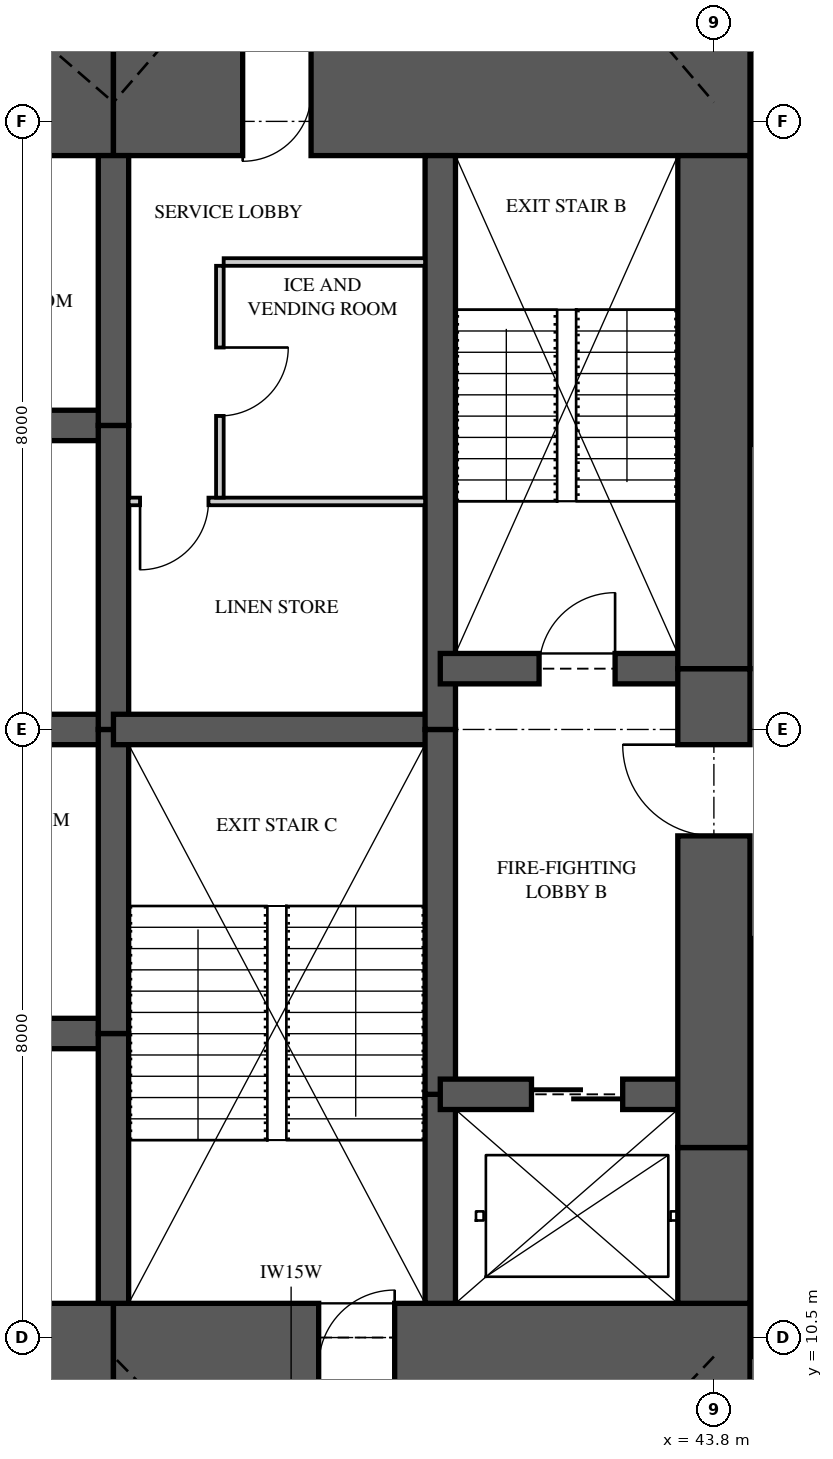
"""IFC4 building model, lengths in metres.
Left out: names, types, materials, properties, quantities, classifications, styles, units other than length and angle.
Written with IfcOpenShell. Run it as: python <this file> out.ifc"""

import sys

from ifc_helpers import new_model, si_unit, direction, frame, frame_2d, origin, place, context, subcontext, project, spatial, rectangle, extrude, element, fill, save


model = new_model("IFC4")
c1 = context("Model", 3, precision=1e-05, world=origin(), true_north=direction((0.0, 1.0)))
c2 = subcontext(c1, "Body", "Model", "MODEL_VIEW")
j1 = project(units=[si_unit("LENGTHUNIT", "METRE"), si_unit("PLANEANGLEUNIT", "RADIAN")], contexts=[c1])
p1 = place(None, origin())
s1 = spatial("IfcSite", under=j1, at=p1, CompositionType="ELEMENT")
p2 = place(p1, origin())
s2 = spatial("IfcBuilding", under=s1, at=p2, CompositionType="ELEMENT")
p3 = place(p2, frame((0.0, 0.0, 71.25)))
s3 = spatial("IfcBuildingStorey", under=s2, at=p3, CompositionType="ELEMENT", Elevation=71.25)
p4 = place(p3, frame((31.6, 10.125, 0.0), z_axis=(0.0, 0.0, 1.0), x_axis=(1.0, 0.0, 0.0)))
e1 = element("IfcWall", 1, at=p4, inside=s3, PredefinedType="SHEAR", context=c2, shape_type="SweptSolid", body=[
    extrude(rectangle(XDim=4.3, YDim=1.65, at=frame_2d((2.15, 0.0))), origin(), (0.0, 0.0, 1.0), 3.5),
])
p5 = place(p3, frame((35.9, 10.125, 0.0), z_axis=(0.0, 0.0, 1.0), x_axis=(1.0, 0.0, 0.0)))
e2 = element("IfcWall", 2, at=p5, inside=s3, PredefinedType="SHEAR", context=c2, shape_type="SweptSolid", body=[
    extrude(rectangle(XDim=8.375, YDim=1.65, at=frame_2d((4.188, 0.0))), origin(), (0.0, 0.0, 1.0), 3.5),
])
p6 = place(p5, frame((2.7, 0.0, 0.0)))
e3 = element("IfcOpeningElement", 3, at=p6, cuts=e2, PredefinedType="OPENING", context=c2, shape_type="SweptSolid", body=[
    extrude(rectangle(XDim=1.0, YDim=2.1, at=frame_2d((0.5, 1.05))), frame((0.0, 0.835, 0.0), z_axis=(0.0, -1.0, 0.0), x_axis=(1.0, 0.0, 0.0)), (0.0, 0.0, 1.0), 1.67),
])
p7 = place(p3, frame((44.275, 26.875, 0.0), z_axis=(0.0, 0.0, 1.0), x_axis=(-1.0, 0.0, 0.0)))
e4 = element("IfcWall", 4, at=p7, inside=s3, PredefinedType="SHEAR", context=c2, shape_type="SweptSolid", body=[
    extrude(rectangle(XDim=8.375, YDim=1.65, at=frame_2d((4.188, 0.0))), origin(), (0.0, 0.0, 1.0), 3.5),
])
p8 = place(p7, frame((5.775, 0.0, 0.0)))
e5 = element("IfcOpeningElement", 5, at=p8, cuts=e4, PredefinedType="OPENING", context=c2, shape_type="SweptSolid", body=[
    extrude(rectangle(XDim=0.9, YDim=2.1, at=frame_2d((0.45, 1.05))), frame((0.0, 0.835, 0.0), z_axis=(0.0, -1.0, 0.0), x_axis=(1.0, 0.0, 0.0)), (0.0, 0.0, 1.0), 1.67),
])
p9 = place(p3, frame((35.9, 26.875, 0.0), z_axis=(0.0, 0.0, 1.0), x_axis=(-1.0, 0.0, 0.0)))
e6 = element("IfcWall", 6, at=p9, inside=s3, PredefinedType="SHEAR", context=c2, shape_type="SweptSolid", body=[
    extrude(rectangle(XDim=4.3, YDim=1.65, at=frame_2d((2.15, 0.0))), origin(), (0.0, 0.0, 1.0), 3.5),
])
p10 = place(p3, frame((43.8, 10.95, 0.0), z_axis=(0.0, 0.0, 1.0), x_axis=(0.0, 1.0, 0.0)))
e7 = element("IfcWall", 7, at=p10, inside=s3, PredefinedType="SHEAR", context=c2, shape_type="SweptSolid", body=[
    extrude(rectangle(XDim=2.05, YDim=0.95, at=frame_2d((1.025, 0.0))), origin(), (0.0, 0.0, 1.0), 3.5),
])
p11 = place(p3, frame((43.8, 13.0, 0.0), z_axis=(0.0, 0.0, 1.0), x_axis=(0.0, 1.0, 0.0)))
e8 = element("IfcWall", 8, at=p11, inside=s3, PredefinedType="SHEAR", context=c2, shape_type="SweptSolid", body=[
    extrude(rectangle(XDim=6.3, YDim=0.95, at=frame_2d((3.15, 0.0))), origin(), (0.0, 0.0, 1.0), 3.5),
])
p12 = place(p11, frame((4.1, 0.0, 0.0)))
e9 = element("IfcOpeningElement", 9, at=p12, cuts=e8, PredefinedType="OPENING", context=c2, shape_type="SweptSolid", body=[
    extrude(rectangle(XDim=1.2, YDim=2.2, at=frame_2d((0.6, 1.1))), frame((0.0, 0.485, 0.0), z_axis=(0.0, -1.0, 0.0), x_axis=(1.0, 0.0, 0.0)), (0.0, 0.0, 1.0), 0.97),
])
p13 = place(p3, frame((43.8, 19.3, 0.0), z_axis=(0.0, 0.0, 1.0), x_axis=(0.0, 1.0, 0.0)))
e10 = element("IfcWall", 10, at=p13, inside=s3, PredefinedType="SHEAR", context=c2, shape_type="SweptSolid", body=[
    extrude(rectangle(XDim=6.75, YDim=0.95, at=frame_2d((3.375, 0.0))), origin(), (0.0, 0.0, 1.0), 3.5),
])
p14 = place(p3, frame((35.9, 10.95, 0.0), z_axis=(0.0, 0.0, 1.0), x_axis=(0.0, 1.0, 0.0)))
e11 = element("IfcWall", 11, at=p14, inside=s3, PredefinedType="SHEAR", context=c2, shape_type="SweptSolid", body=[
    extrude(rectangle(XDim=3.55, YDim=0.4, at=frame_2d((1.775, 0.0))), origin(), (0.0, 0.0, 1.0), 3.5),
])
for number, where, z_axis, x_axis in (
    (12, (35.9, 14.5, 0.0), (0.0, 0.0, 1.0), (0.0, 1.0, 0.0)),
    (13, (35.9, 18.5, 0.0), (0.0, 0.0, 1.0), (0.0, 1.0, 0.0)),
):
    element("IfcWall", number, at=place(p3, frame(where, z_axis=z_axis, x_axis=x_axis)), inside=s3, PredefinedType="SHEAR", context=c2, shape_type="SweptSolid", body=[
        extrude(rectangle(XDim=4.0, YDim=0.4, at=frame_2d((2.0, 0.0))), origin(), (0.0, 0.0, 1.0), 3.5),
    ])
p15 = place(p3, frame((35.9, 22.5, 0.0), z_axis=(0.0, 0.0, 1.0), x_axis=(0.0, 1.0, 0.0)))
e14 = element("IfcWall", 14, at=p15, inside=s3, PredefinedType="SHEAR", context=c2, shape_type="SweptSolid", body=[
    extrude(rectangle(XDim=3.55, YDim=0.4, at=frame_2d((1.775, 0.0))), origin(), (0.0, 0.0, 1.0), 3.5),
])
p16 = place(p3, frame((40.2, 10.95, 0.0), z_axis=(0.0, 0.0, 1.0), x_axis=(0.0, 1.0, 0.0)))
e15 = element("IfcWall", 15, at=p16, inside=s3, PredefinedType="SHEAR", context=c2, shape_type="SweptSolid", body=[
    extrude(rectangle(XDim=2.75, YDim=0.4, at=frame_2d((1.375, 0.0))), origin(), (0.0, 0.0, 1.0), 3.5),
])
p17 = place(p3, frame((40.2, 13.7, 0.0), z_axis=(0.0, 0.0, 1.0), x_axis=(0.0, 1.0, 0.0)))
e16 = element("IfcWall", 16, at=p17, inside=s3, PredefinedType="SHEAR", context=c2, shape_type="SweptSolid", body=[
    extrude(rectangle(XDim=4.8, YDim=0.4, at=frame_2d((2.4, 0.0))), origin(), (0.0, 0.0, 1.0), 3.5),
])
p18 = place(p3, frame((40.2, 18.5, 0.0), z_axis=(0.0, 0.0, 1.0), x_axis=(0.0, 1.0, 0.0)))
e17 = element("IfcWall", 17, at=p18, inside=s3, PredefinedType="SHEAR", context=c2, shape_type="SweptSolid", body=[
    extrude(rectangle(XDim=7.55, YDim=0.4, at=frame_2d((3.775, 0.0))), origin(), (0.0, 0.0, 1.0), 3.5),
])
for number, where, z_axis, x_axis in (
    (18, (31.6, 14.5, 0.0), (0.0, 0.0, 1.0), (1.0, 0.0, 0.0)),
    (19, (31.6, 18.5, 0.0), (0.0, 0.0, 1.0), (1.0, 0.0, 0.0)),
    (20, (31.6, 22.5, 0.0), (0.0, 0.0, 1.0), (1.0, 0.0, 0.0)),
):
    element("IfcWall", number, at=place(p3, frame(where, z_axis=z_axis, x_axis=x_axis)), inside=s3, PredefinedType="SHEAR", context=c2, shape_type="SweptSolid", body=[
        extrude(rectangle(XDim=4.3, YDim=0.4, at=frame_2d((2.15, 0.0))), origin(), (0.0, 0.0, 1.0), 3.5),
    ])
p19 = place(p3, frame((35.9, 18.5, 0.0), z_axis=(0.0, 0.0, 1.0), x_axis=(1.0, 0.0, 0.0)))
e21 = element("IfcWall", 21, at=p19, inside=s3, PredefinedType="SHEAR", context=c2, shape_type="SweptSolid", body=[
    extrude(rectangle(XDim=4.3, YDim=0.4, at=frame_2d((2.15, 0.0))), origin(), (0.0, 0.0, 1.0), 3.5),
])
p20 = place(p3, frame((40.2, 13.7, 0.0), z_axis=(0.0, 0.0, 1.0), x_axis=(1.0, 0.0, 0.0)))
e22 = element("IfcWall", 22, at=p20, inside=s3, PredefinedType="SHEAR", context=c2, shape_type="SweptSolid", body=[
    extrude(rectangle(XDim=3.6, YDim=0.4, at=frame_2d((1.8, 0.0))), origin(), (0.0, 0.0, 1.0), 3.5),
])
p21 = place(p20, frame((1.2, 0.0, 0.0)))
e23 = element("IfcOpeningElement", 23, at=p21, cuts=e22, PredefinedType="OPENING", context=c2, shape_type="SweptSolid", body=[
    extrude(rectangle(XDim=1.2, YDim=2.1, at=frame_2d((0.6, 1.05))), frame((0.0, 0.21, 0.0), z_axis=(0.0, -1.0, 0.0), x_axis=(1.0, 0.0, 0.0)), (0.0, 0.0, 1.0), 0.42),
])
p22 = place(p3, frame((40.2, 19.3, 0.0), z_axis=(0.0, 0.0, 1.0), x_axis=(1.0, 0.0, 0.0)))
e24 = element("IfcWall", 24, at=p22, inside=s3, PredefinedType="SHEAR", context=c2, shape_type="SweptSolid", body=[
    extrude(rectangle(XDim=3.6, YDim=0.4, at=frame_2d((1.8, 0.0))), origin(), (0.0, 0.0, 1.0), 3.5),
])
p23 = place(p22, frame((1.3, 0.0, 0.0)))
e25 = element("IfcOpeningElement", 25, at=p23, cuts=e24, PredefinedType="OPENING", context=c2, shape_type="SweptSolid", body=[
    extrude(rectangle(XDim=1.0, YDim=2.1, at=frame_2d((0.5, 1.05))), frame((0.0, 0.21, 0.0), z_axis=(0.0, -1.0, 0.0), x_axis=(1.0, 0.0, 0.0)), (0.0, 0.0, 1.0), 0.42),
])
p24 = place(p3, frame((37.35, 24.65, 0.0), z_axis=(0.0, 0.0, 1.0), x_axis=(1.0, 0.0, 0.0)))
e26 = element("IfcWall", 26, at=p24, inside=s3, PredefinedType="PARTITIONING", context=c2, shape_type="SweptSolid", body=[
    extrude(rectangle(XDim=2.65, YDim=0.1, at=frame_2d((1.325, 0.0))), origin(), (0.0, 0.0, 1.0), 3.22),
])
p25 = place(p3, frame((37.3, 21.55, 0.0), z_axis=(0.0, 0.0, 1.0), x_axis=(0.0, 1.0, 0.0)))
e27 = element("IfcWall", 27, at=p25, inside=s3, PredefinedType="PARTITIONING", context=c2, shape_type="SweptSolid", body=[
    extrude(rectangle(XDim=3.05, YDim=0.1, at=frame_2d((1.525, 0.0))), origin(), (0.0, 0.0, 1.0), 3.22),
])
p26 = place(p25, frame((1.075, 0.0, 0.0)))
e28 = element("IfcOpeningElement", 28, at=p26, cuts=e27, PredefinedType="OPENING", context=c2, shape_type="SweptSolid", body=[
    extrude(rectangle(XDim=0.9, YDim=2.1, at=frame_2d((0.45, 1.05))), frame((0.0, 0.06, 0.0), z_axis=(0.0, -1.0, 0.0), x_axis=(1.0, 0.0, 0.0)), (0.0, 0.0, 1.0), 0.12),
])
p27 = place(p3, frame((36.1, 21.5, 0.0), z_axis=(0.0, 0.0, 1.0), x_axis=(1.0, 0.0, 0.0)))
e29 = element("IfcWall", 29, at=p27, inside=s3, PredefinedType="PARTITIONING", context=c2, shape_type="SweptSolid", body=[
    extrude(rectangle(XDim=3.9, YDim=0.1, at=frame_2d((1.95, 0.0))), origin(), (0.0, 0.0, 1.0), 3.22),
])
p28 = place(p27, frame((0.15, 0.0, 0.0)))
e30 = element("IfcOpeningElement", 30, at=p28, cuts=e29, PredefinedType="OPENING", context=c2, shape_type="SweptSolid", body=[
    extrude(rectangle(XDim=0.9, YDim=2.1, at=frame_2d((0.45, 1.05))), frame((0.0, 0.06, 0.0), z_axis=(0.0, -1.0, 0.0), x_axis=(1.0, 0.0, 0.0)), (0.0, 0.0, 1.0), 0.12),
])
p29 = place(p26, frame((0.9, 0.0, 0.0), z_axis=(0.0, 0.0, 1.0), x_axis=(-1.0, 0.0, 0.0)))
e31 = element("IfcDoor", 31, at=p29, inside=s3, OperationType="SINGLE_SWING_LEFT", PredefinedType="DOOR", context=c2, shape_type="SweptSolid", body=[
    extrude(rectangle(XDim=0.9, YDim=2.1, at=frame_2d((0.45, 1.05))), frame((0.0, 0.025, 0.0), z_axis=(0.0, -1.0, 0.0), x_axis=(1.0, 0.0, 0.0)), (0.0, 0.0, 1.0), 0.05),
])
fill(e28, e31)
p30 = place(p28, frame((0.9, 0.0, 0.0), z_axis=(0.0, 0.0, 1.0), x_axis=(-1.0, 0.0, 0.0)))
e32 = element("IfcDoor", 32, at=p30, inside=s3, OperationType="SINGLE_SWING_RIGHT", PredefinedType="DOOR", context=c2, shape_type="SweptSolid", body=[
    extrude(rectangle(XDim=0.9, YDim=2.1, at=frame_2d((0.45, 1.05))), frame((0.0, 0.025, 0.0), z_axis=(0.0, -1.0, 0.0), x_axis=(1.0, 0.0, 0.0)), (0.0, 0.0, 1.0), 0.05),
])
fill(e30, e32)
p31 = place(p23, origin())
e33 = element("IfcDoor", 33, at=p31, inside=s3, OperationType="SINGLE_SWING_RIGHT", PredefinedType="DOOR", context=c2, shape_type="SweptSolid", body=[
    extrude(rectangle(XDim=1.0, YDim=2.1, at=frame_2d((0.5, 1.05))), frame((0.0, 0.025, 0.0), z_axis=(0.0, -1.0, 0.0), x_axis=(1.0, 0.0, 0.0)), (0.0, 0.0, 1.0), 0.05),
])
fill(e25, e33)
p32 = place(p12, origin())
e34 = element("IfcDoor", 34, at=p32, inside=s3, OperationType="SINGLE_SWING_RIGHT", PredefinedType="DOOR", context=c2, shape_type="SweptSolid", body=[
    extrude(rectangle(XDim=1.2, YDim=2.2, at=frame_2d((0.6, 1.1))), frame((0.0, 0.025, 0.0), z_axis=(0.0, -1.0, 0.0), x_axis=(1.0, 0.0, 0.0)), (0.0, 0.0, 1.0), 0.05),
])
fill(e9, e34)
p33 = place(p21, origin())
e35 = element("IfcDoor", 35, at=p33, inside=s3, OperationType="SLIDING_TO_LEFT", PredefinedType="DOOR", context=c2, shape_type="SweptSolid", body=[
    extrude(rectangle(XDim=1.2, YDim=2.1, at=frame_2d((0.6, 1.05))), frame((0.0, 0.025, 0.0), z_axis=(0.0, -1.0, 0.0), x_axis=(1.0, 0.0, 0.0)), (0.0, 0.0, 1.0), 0.05),
])
fill(e23, e35)
p34 = place(p6, origin())
e36 = element("IfcDoor", 36, at=p34, inside=s3, OperationType="SINGLE_SWING_RIGHT", PredefinedType="DOOR", context=c2, shape_type="SweptSolid", body=[
    extrude(rectangle(XDim=1.0, YDim=2.1, at=frame_2d((0.5, 1.05))), frame((0.0, 0.025, 0.0), z_axis=(0.0, -1.0, 0.0), x_axis=(1.0, 0.0, 0.0)), (0.0, 0.0, 1.0), 0.05),
])
fill(e3, e36)
p35 = place(p8, origin())
e37 = element("IfcDoor", 37, at=p35, inside=s3, OperationType="SINGLE_SWING_RIGHT", PredefinedType="DOOR", context=c2, shape_type="SweptSolid", body=[
    extrude(rectangle(XDim=0.9, YDim=2.1, at=frame_2d((0.45, 1.05))), frame((0.0, 0.47, 0.0), z_axis=(0.0, -1.0, 0.0), x_axis=(1.0, 0.0, 0.0)), (0.0, 0.0, 1.0), 0.8),
])
fill(e5, e37)
save(model, sys.argv[1])
